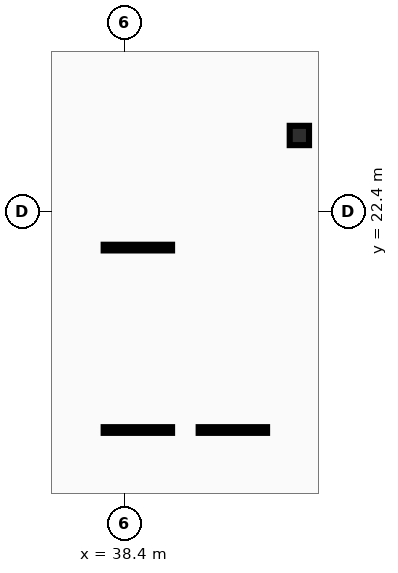
"""IFC4 building model, lengths in metres.
Left out: names, types, materials, properties, quantities, classifications, styles, units other than length and angle.
Written with IfcOpenShell. Run it as: python <this file> out.ifc"""

import sys

from ifc_helpers import new_model, si_unit, direction, frame, origin, origin_2d, place, context, subcontext, project, spatial, hollow_circle, extrude, element, save


model = new_model("IFC4")
c1 = context("Model", 3, precision=1e-05, world=origin(), true_north=direction((0.0, 1.0)))
c2 = subcontext(c1, "Body", "Model", "MODEL_VIEW")
j1 = project(units=[si_unit("LENGTHUNIT", "METRE"), si_unit("PLANEANGLEUNIT", "RADIAN")], contexts=[c1])
p1 = place(None, origin())
s1 = spatial("IfcSite", under=j1, at=p1, CompositionType="ELEMENT")
p2 = place(p1, origin())
s2 = spatial("IfcBuilding", under=s1, at=p2, CompositionType="ELEMENT")
p3 = place(p2, frame((0.0, 0.0, -4.08)))
s3 = spatial("IfcBuildingStorey", under=s2, at=p3, CompositionType="ELEMENT", Elevation=-4.08)
p4 = place(p3, frame((43.0, 24.4, 0.0), z_axis=(0.0, 0.0, 1.0), x_axis=(1.0, 0.0, 0.0)))
e1 = element("IfcColumn", 1, at=p4, inside=s3, PredefinedType="COLUMN", context=c2, shape_type="SweptSolid", body=[
    extrude(hollow_circle(Radius=0.254, WallThickness=0.02, at=origin_2d()), origin(), (0.0, 0.0, 1.0), 3.76),
])
save(model, sys.argv[1])
